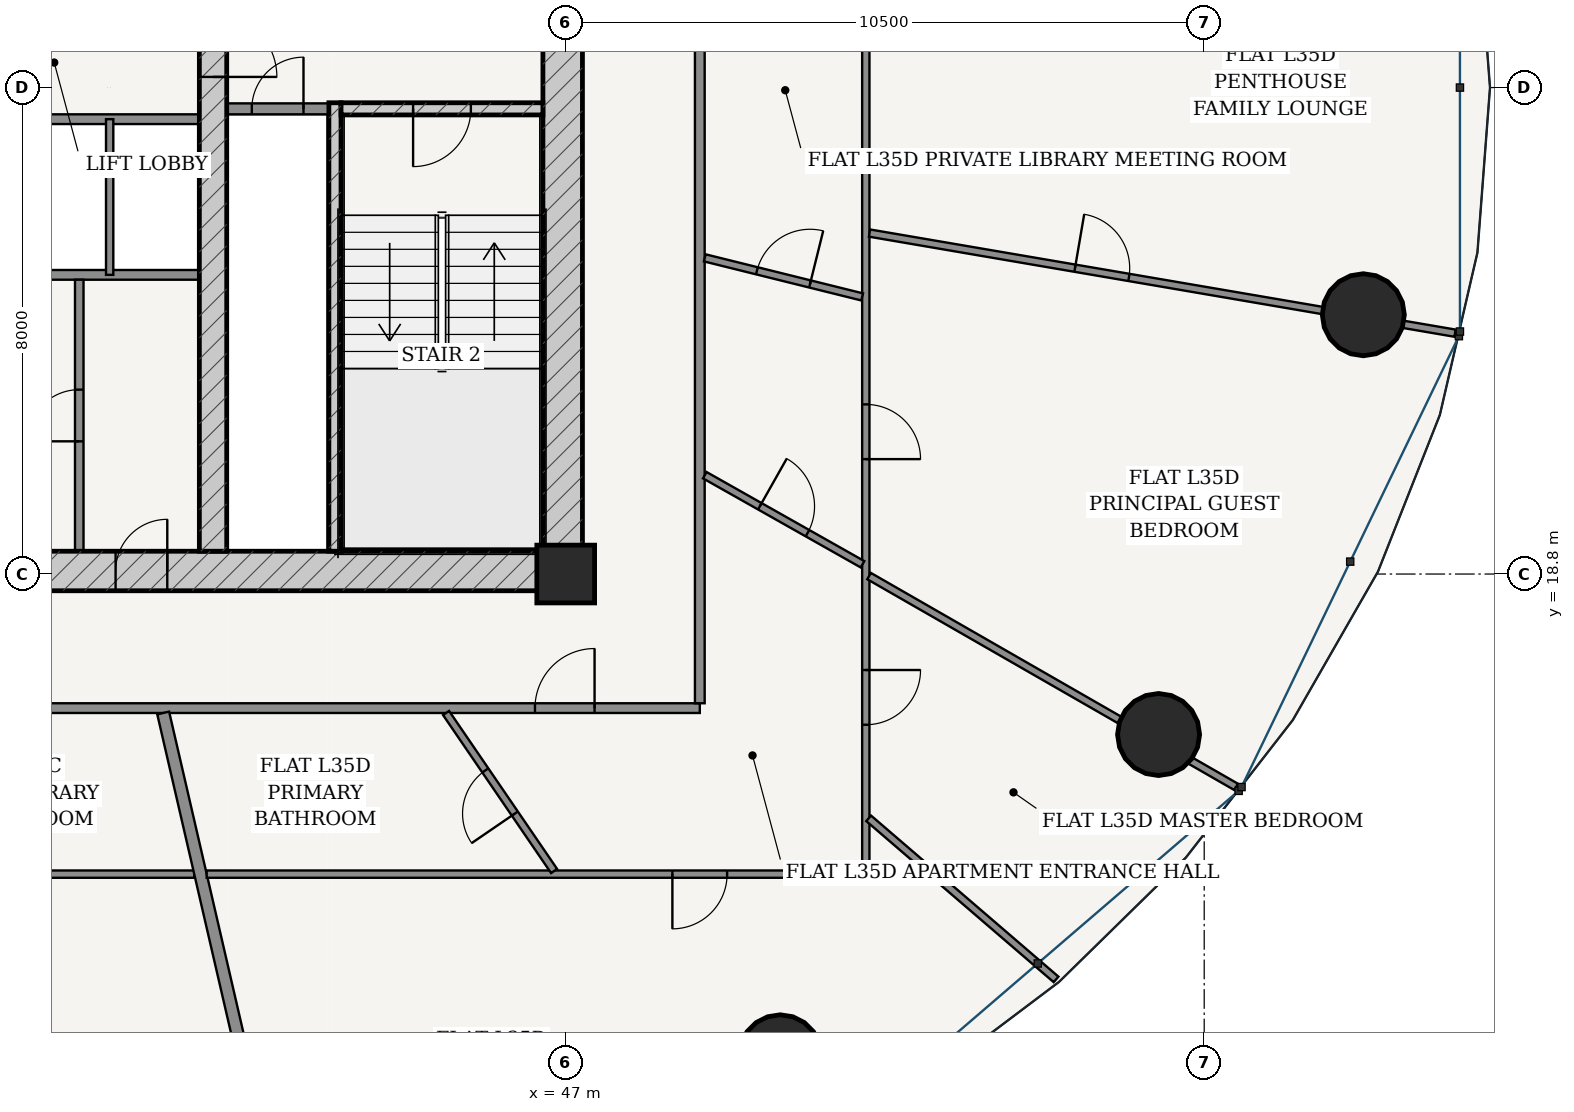
"""IFC4 building model, lengths in metres.
Left out: names, types, materials, properties, quantities, classifications, styles, units other than length and angle.
Written with IfcOpenShell. Run it as: python <this file> out.ifc"""

import sys

from ifc_helpers import new_model, si_unit, direction, frame, frame_2d, origin, origin_2d, place, context, subcontext, project, spatial, rectangle, hollow_circle, extrude, source, transform, mapped, element, fill, save


model = new_model("IFC4")
c1 = context("Model", 3, precision=1e-05, world=origin(), true_north=direction((-0.2419218956, 0.970295726276)))
c2 = subcontext(c1, "Body", "Model", "MODEL_VIEW")
j1 = project(units=[si_unit("LENGTHUNIT", "METRE"), si_unit("PLANEANGLEUNIT", "RADIAN")], contexts=[c1])
p1 = place(None, origin())
s1 = spatial("IfcSite", under=j1, at=p1, CompositionType="ELEMENT")
p2 = place(p1, origin())
s2 = spatial("IfcBuilding", under=s1, at=p2, CompositionType="ELEMENT")
p3 = place(p2, frame((0.0, 0.0, 135.4)))
s3 = spatial("IfcBuildingStorey", under=s2, at=p3, CompositionType="ELEMENT", Elevation=135.4)
p4 = place(p3, frame((47.0, 18.8, 0.0), z_axis=(0.0, 0.0, 1.0), x_axis=(1.0, 0.0, 0.0)))
e1 = element("IfcColumn", 1, at=p4, inside=s3, PredefinedType="COLUMN", context=c2, shape_type="SweptSolid", body=[
    extrude(rectangle(XDim=0.95, YDim=0.95, at=origin_2d()), origin(), (0.0, 0.0, 1.0), 3.6),
])
p5 = place(p3, frame((28.725, 18.85, 0.0), z_axis=(0.0, 0.0, 1.0), x_axis=(1.0, 0.0, 0.0)))
e2 = element("IfcWall", 2, at=p5, inside=s3, PredefinedType="SHEAR", context=c2, shape_type="SweptSolid", body=[
    extrude(rectangle(XDim=18.55, YDim=0.65, at=frame_2d((9.275, 0.0))), origin(), (0.0, 0.0, 1.0), 3.33),
])
p6 = place(p5, frame((6.827, 0.0, 0.0)))
e3 = element("IfcOpeningElement", 3, at=p6, cuts=e2, PredefinedType="OPENING", context=c2, shape_type="SweptSolid", body=[
    extrude(rectangle(XDim=0.85, YDim=2.1, at=frame_2d((0.425, 1.05))), frame((0.0, 0.335, 0.0), z_axis=(0.0, -1.0, 0.0), x_axis=(1.0, 0.0, 0.0)), (0.0, 0.0, 1.0), 0.67),
])
p7 = place(p5, frame((8.85, 0.0, 0.0)))
e4 = element("IfcOpeningElement", 4, at=p7, cuts=e2, PredefinedType="OPENING", context=c2, shape_type="SweptSolid", body=[
    extrude(rectangle(XDim=0.85, YDim=2.1, at=frame_2d((0.425, 1.05))), frame((0.0, 0.335, 0.0), z_axis=(0.0, -1.0, 0.0), x_axis=(1.0, 0.0, 0.0)), (0.0, 0.0, 1.0), 0.67),
])
p8 = place(p5, frame((10.873, 0.0, 0.0)))
e5 = element("IfcOpeningElement", 5, at=p8, cuts=e2, PredefinedType="OPENING", context=c2, shape_type="SweptSolid", body=[
    extrude(rectangle(XDim=0.85, YDim=2.1, at=frame_2d((0.425, 1.05))), frame((0.0, 0.335, 0.0), z_axis=(0.0, -1.0, 0.0), x_axis=(1.0, 0.0, 0.0)), (0.0, 0.0, 1.0), 0.67),
])
p9 = place(p3, frame((46.95, 19.175, 0.0), z_axis=(0.0, 0.0, 1.0), x_axis=(0.0, 1.0, 0.0)))
e6 = element("IfcWall", 6, at=p9, inside=s3, PredefinedType="SHEAR", context=c2, shape_type="SweptSolid", body=[
    extrude(rectangle(XDim=15.25, YDim=0.65, at=frame_2d((7.625, 0.0))), origin(), (0.0, 0.0, 1.0), 3.33),
])
p10 = place(p9, frame((9.875, 0.0, 0.0)))
e7 = element("IfcOpeningElement", 7, at=p10, cuts=e6, PredefinedType="OPENING", context=c2, shape_type="SweptSolid", body=[
    extrude(rectangle(XDim=1.5, YDim=2.2, at=frame_2d((0.75, 1.1))), frame((0.0, 0.335, 0.0), z_axis=(0.0, -1.0, 0.0), x_axis=(1.0, 0.0, 0.0)), (0.0, 0.0, 1.0), 0.67),
])
p11 = place(p3, frame((43.205, 19.175, 0.0), z_axis=(0.0, 0.0, 1.0), x_axis=(0.0, 1.0, 0.0)))
e8 = element("IfcWall", 8, at=p11, inside=s3, PredefinedType="SOLIDWALL", context=c2, shape_type="SweptSolid", body=[
    extrude(rectangle(XDim=7.375, YDim=0.2, at=frame_2d((3.688, 0.0))), origin(), (0.0, 0.0, 1.0), 3.33),
])
p12 = place(p3, frame((43.305, 26.45, 0.0), z_axis=(0.0, 0.0, 1.0), x_axis=(1.0, 0.0, 0.0)))
e9 = element("IfcWall", 9, at=p12, inside=s3, PredefinedType="SOLIDWALL", context=c2, shape_type="SweptSolid", body=[
    extrude(rectangle(XDim=3.32, YDim=0.2, at=frame_2d((1.66, 0.0))), origin(), (0.0, 0.0, 1.0), 3.33),
])
p13 = place(p12, frame((1.185, 0.0, 0.0)))
e10 = element("IfcOpeningElement", 10, at=p13, cuts=e9, PredefinedType="OPENING", context=c2, shape_type="SweptSolid", body=[
    extrude(rectangle(XDim=0.95, YDim=2.15, at=frame_2d((0.475, 1.075))), frame((0.0, 0.11, 0.0), z_axis=(0.0, -1.0, 0.0), x_axis=(1.0, 0.0, 0.0)), (0.0, 0.0, 1.0), 0.22),
])
p14 = place(p3, frame((41.2, 19.175, 0.0), z_axis=(0.0, 0.0, 1.0), x_axis=(0.0, 1.0, 0.0)))
e11 = element("IfcWall", 11, at=p14, inside=s3, PredefinedType="SHEAR", context=c2, shape_type="SweptSolid", body=[
    extrude(rectangle(XDim=15.25, YDim=0.45, at=frame_2d((7.625, 0.0))), origin(), (0.0, 0.0, 1.0), 3.33),
])
p15 = place(p14, frame((7.8, 0.0, 0.0)))
e12 = element("IfcOpeningElement", 12, at=p15, cuts=e11, PredefinedType="OPENING", context=c2, shape_type="SweptSolid", body=[
    extrude(rectangle(XDim=1.05, YDim=2.15, at=frame_2d((0.525, 1.075))), frame((0.0, 0.235, 0.0), z_axis=(0.0, -1.0, 0.0), x_axis=(1.0, 0.0, 0.0)), (0.0, 0.0, 1.0), 0.47),
])
for number, where, z_axis, x_axis in (
    (13, (50.528, 10.877, 0.0), (0.0, 0.0, 1.0), (1.0, 0.0, 0.0)),
    (14, (56.75, 16.161, 0.0), (0.0, 0.0, 1.0), (1.0, 0.0, 0.0)),
    (15, (60.117, 23.064, 0.0), (0.0, 0.0, 1.0), (1.0, 0.0, 0.0)),
):
    element("IfcColumn", number, at=place(p3, frame(where, z_axis=z_axis, x_axis=x_axis)), inside=s3, PredefinedType="COLUMN", context=c2, shape_type="SweptSolid", body=[
        extrude(hollow_circle(Radius=0.675, WallThickness=0.042, at=origin_2d()), origin(), (0.0, 0.0, 1.0), 3.6),
    ])
p16 = place(p3, frame((41.425, 26.45, 0.0), z_axis=(0.0, 0.0, 1.0), x_axis=(1.0, 0.0, 0.0)))
e16 = element("IfcWall", 16, at=p16, inside=s3, PredefinedType="PARTITIONING", context=c2, shape_type="SweptSolid", body=[
    extrude(rectangle(XDim=1.675, YDim=0.18, at=frame_2d((0.837, 0.0))), origin(), (0.0, 0.0, 1.0), 3.33),
])
p17 = place(p16, frame((0.413, 0.0, 0.0)))
e17 = element("IfcOpeningElement", 17, at=p17, cuts=e16, PredefinedType="OPENING", context=c2, shape_type="SweptSolid", body=[
    extrude(rectangle(XDim=0.85, YDim=2.1, at=frame_2d((0.425, 1.05))), frame((0.0, 0.1, 0.0), z_axis=(0.0, -1.0, 0.0), x_axis=(1.0, 0.0, 0.0)), (0.0, 0.0, 1.0), 0.2),
])
p18 = place(p3, frame((35.025, 26.28, 0.0), z_axis=(0.0, 0.0, 1.0), x_axis=(1.0, 0.0, 0.0)))
e18 = element("IfcWall", 18, at=p18, inside=s3, PredefinedType="PARTITIONING", context=c2, shape_type="SweptSolid", body=[
    extrude(rectangle(XDim=5.95, YDim=0.16, at=frame_2d((2.975, 0.0))), origin(), (0.0, 0.0, 1.0), 3.33),
])
p19 = place(p18, frame((0.19, 0.0, 0.0)))
e19 = element("IfcOpeningElement", 19, at=p19, cuts=e18, PredefinedType="OPENING", context=c2, shape_type="SweptSolid", body=[
    extrude(rectangle(XDim=1.1, YDim=2.2, at=frame_2d((0.55, 1.1))), frame((0.0, 0.09, 0.0), z_axis=(0.0, -1.0, 0.0), x_axis=(1.0, 0.0, 0.0)), (0.0, 0.0, 1.0), 0.18),
])
p20 = place(p18, frame((1.67, 0.0, 0.0)))
e20 = element("IfcOpeningElement", 20, at=p20, cuts=e18, PredefinedType="OPENING", context=c2, shape_type="SweptSolid", body=[
    extrude(rectangle(XDim=1.1, YDim=2.2, at=frame_2d((0.55, 1.1))), frame((0.0, 0.09, 0.0), z_axis=(0.0, -1.0, 0.0), x_axis=(1.0, 0.0, 0.0)), (0.0, 0.0, 1.0), 0.18),
])
p21 = place(p3, frame((35.025, 23.72, 0.0), z_axis=(0.0, 0.0, 1.0), x_axis=(1.0, 0.0, 0.0)))
e21 = element("IfcWall", 21, at=p21, inside=s3, PredefinedType="PARTITIONING", context=c2, shape_type="SweptSolid", body=[
    extrude(rectangle(XDim=5.95, YDim=0.16, at=frame_2d((2.975, 0.0))), origin(), (0.0, 0.0, 1.0), 3.33),
])
p22 = place(p3, frame((39.5, 23.72, 0.0), z_axis=(0.0, 0.0, 1.0), x_axis=(0.0, 1.0, 0.0)))
e22 = element("IfcWall", 22, at=p22, inside=s3, PredefinedType="PARTITIONING", context=c2, shape_type="SweptSolid", body=[
    extrude(rectangle(XDim=2.56, YDim=0.12, at=frame_2d((1.28, 0.0))), origin(), (0.0, 0.0, 1.0), 3.33),
])
p23 = place(p3, frame((39.0, 19.175, 0.0), z_axis=(0.0, 0.0, 1.0), x_axis=(0.0, 1.0, 0.0)))
e23 = element("IfcWall", 23, at=p23, inside=s3, PredefinedType="PARTITIONING", context=c2, shape_type="SweptSolid", body=[
    extrude(rectangle(XDim=4.465, YDim=0.14, at=frame_2d((2.232, 0.0))), origin(), (0.0, 0.0, 1.0), 3.33),
])
p24 = place(p23, frame((1.808, 0.0, 0.0)))
e24 = element("IfcOpeningElement", 24, at=p24, cuts=e23, PredefinedType="OPENING", context=c2, shape_type="SweptSolid", body=[
    extrude(rectangle(XDim=0.85, YDim=2.1, at=frame_2d((0.425, 1.05))), frame((0.0, 0.08, 0.0), z_axis=(0.0, -1.0, 0.0), x_axis=(1.0, 0.0, 0.0)), (0.0, 0.0, 1.0), 0.16),
])
p25 = place(p3, frame((34.32, 16.595, 0.0), z_axis=(0.0, 0.0, 1.0), x_axis=(1.0, 0.0, 0.0)))
e25 = element("IfcWall", 25, at=p25, inside=s3, PredefinedType="PARTITIONING", context=c2, shape_type="SweptSolid", body=[
    extrude(rectangle(XDim=14.885, YDim=0.16, at=frame_2d((7.442, 0.0))), origin(), (0.0, 0.0, 1.0), 2.776),
])
p26 = place(p25, frame((12.174, 0.0, 0.0)))
e26 = element("IfcOpeningElement", 26, at=p26, cuts=e25, PredefinedType="OPENING", context=c2, shape_type="SweptSolid", body=[
    extrude(rectangle(XDim=0.98, YDim=2.2, at=frame_2d((0.49, 1.1))), frame((0.0, 0.09, 0.0), z_axis=(0.0, -1.0, 0.0), x_axis=(1.0, 0.0, 0.0)), (0.0, 0.0, 1.0), 0.18),
])
p27 = place(p3, frame((49.205, 16.675, 0.0), z_axis=(0.0, 0.0, 1.0), x_axis=(0.0, 1.0, 0.0)))
e27 = element("IfcWall", 27, at=p27, inside=s3, PredefinedType="PARTITIONING", context=c2, shape_type="SweptSolid", body=[
    extrude(rectangle(XDim=18.4, YDim=0.16, at=frame_2d((9.2, 0.0))), origin(), (0.0, 0.0, 1.0), 2.776),
])
p28 = place(p3, frame((40.892, 13.865, 0.0), z_axis=(0.0, 0.0, 1.0), x_axis=(-1.0, 0.0, 0.0)))
e28 = element("IfcWall", 28, at=p28, inside=s3, PredefinedType="PARTITIONING", context=c2, shape_type="SweptSolid", body=[
    extrude(rectangle(XDim=9.302, YDim=0.12, at=frame_2d((4.651, 0.0))), origin(), (0.0, 0.0, 1.0), 2.776),
])
p29 = place(p28, frame((7.652, 0.0, 0.0)))
e29 = element("IfcOpeningElement", 29, at=p29, cuts=e28, PredefinedType="OPENING", context=c2, shape_type="SweptSolid", body=[
    extrude(rectangle(XDim=0.9, YDim=2.15, at=frame_2d((0.45, 1.075))), frame((0.0, 0.07, 0.0), z_axis=(0.0, -1.0, 0.0), x_axis=(1.0, 0.0, 0.0)), (0.0, 0.0, 1.0), 0.14),
])
p30 = place(p3, frame((40.38, 16.515, 0.0), z_axis=(0.0, 0.0, 1.0), x_axis=(0.225473598067, -0.974249278457, 0.0)))
e30 = element("IfcWall", 30, at=p30, inside=s3, PredefinedType="PARTITIONING", context=c2, shape_type="SweptSolid", body=[
    extrude(rectangle(XDim=10.278, YDim=0.2, at=frame_2d((5.139, 0.0))), origin(), (0.0, 0.0, 1.0), 2.776),
])
p31 = place(p3, frame((51.935, 29.08, 0.0), z_axis=(0.0, 0.0, 1.0), x_axis=(0.0, -1.0, 0.0)))
e31 = element("IfcWall", 31, at=p31, inside=s3, PredefinedType="PARTITIONING", context=c2, shape_type="SweptSolid", body=[
    extrude(rectangle(XDim=15.215, YDim=0.12, at=frame_2d((7.608, 0.0))), origin(), (0.0, 0.0, 1.0), 2.776),
])
p32 = place(p31, frame((11.859, 0.0, 0.0)))
e32 = element("IfcOpeningElement", 32, at=p32, cuts=e31, PredefinedType="OPENING", context=c2, shape_type="SweptSolid", body=[
    extrude(rectangle(XDim=0.9, YDim=2.15, at=frame_2d((0.45, 1.075))), frame((0.0, 0.07, 0.0), z_axis=(0.0, -1.0, 0.0), x_axis=(1.0, 0.0, 0.0)), (0.0, 0.0, 1.0), 0.14),
])
p33 = place(p31, frame((7.49, 0.0, 0.0)))
e33 = element("IfcOpeningElement", 33, at=p33, cuts=e31, PredefinedType="OPENING", context=c2, shape_type="SweptSolid", body=[
    extrude(rectangle(XDim=0.9, YDim=2.15, at=frame_2d((0.45, 1.075))), frame((0.0, 0.07, 0.0), z_axis=(0.0, -1.0, 0.0), x_axis=(1.0, 0.0, 0.0)), (0.0, 0.0, 1.0), 0.14),
])
p34 = place(p3, frame((51.935, 13.865, 0.0), z_axis=(0.0, 0.0, 1.0), x_axis=(-1.0, 0.0, 0.0)))
e34 = element("IfcWall", 34, at=p34, inside=s3, PredefinedType="PARTITIONING", context=c2, shape_type="SweptSolid", body=[
    extrude(rectangle(XDim=10.84, YDim=0.12, at=frame_2d((5.42, 0.0))), origin(), (0.0, 0.0, 1.0), 2.776),
])
p35 = place(p34, frame((2.281, 0.0, 0.0)))
e35 = element("IfcOpeningElement", 35, at=p35, cuts=e34, PredefinedType="OPENING", context=c2, shape_type="SweptSolid", body=[
    extrude(rectangle(XDim=0.9, YDim=2.15, at=frame_2d((0.45, 1.075))), frame((0.0, 0.07, 0.0), z_axis=(0.0, -1.0, 0.0), x_axis=(1.0, 0.0, 0.0)), (0.0, 0.0, 1.0), 0.14),
])
p36 = place(p3, frame((51.982, 14.782, 0.0), z_axis=(0.0, 0.0, 1.0), x_axis=(0.758356837469, -0.651839632935, 0.0)))
e36 = element("IfcWall", 36, at=p36, inside=s3, PredefinedType="PARTITIONING", context=c2, shape_type="SweptSolid", body=[
    extrude(rectangle(XDim=4.064, YDim=0.12, at=frame_2d((2.032, 0.0))), origin(), (0.0, 0.0, 1.0), 2.846),
])
p37 = place(p3, frame((51.989, 18.766, 0.0), z_axis=(0.0, 0.0, 1.0), x_axis=(0.86717064002, -0.498011125466, 0.0)))
e37 = element("IfcWall", 37, at=p37, inside=s3, PredefinedType="PARTITIONING", context=c2, shape_type="SweptSolid", body=[
    extrude(rectangle(XDim=6.961, YDim=0.12, at=frame_2d((3.48, 0.0))), origin(), (0.0, 0.0, 1.0), 2.776),
])
p38 = place(p3, frame((51.996, 24.407, 0.0), z_axis=(0.0, 0.0, 1.0), x_axis=(0.985698378271, -0.168519159369, 0.0)))
e38 = element("IfcWall", 38, at=p38, inside=s3, PredefinedType="PARTITIONING", context=c2, shape_type="SweptSolid", body=[
    extrude(rectangle(XDim=9.769, YDim=0.12, at=frame_2d((4.884, 0.0))), origin(), (0.0, 0.0, 1.0), 2.776),
])
p39 = place(p38, frame((3.428, 0.0, 0.0)))
e39 = element("IfcOpeningElement", 39, at=p39, cuts=e38, PredefinedType="OPENING", context=c2, shape_type="SweptSolid", body=[
    extrude(rectangle(XDim=0.9, YDim=2.15, at=frame_2d((0.45, 1.075))), frame((0.0, 0.07, 0.0), z_axis=(0.0, -1.0, 0.0), x_axis=(1.0, 0.0, 0.0)), (0.0, 0.0, 1.0), 0.14),
])
p40 = place(p3, frame((45.032, 16.515, 0.0), z_axis=(0.0, 0.0, 1.0), x_axis=(0.564486512722, -0.825442291717, 0.0)))
e40 = element("IfcWall", 40, at=p40, inside=s3, PredefinedType="PARTITIONING", context=c2, shape_type="SweptSolid", body=[
    extrude(rectangle(XDim=3.148, YDim=0.12, at=frame_2d((1.574, 0.0))), origin(), (0.0, 0.0, 1.0), 3.005),
])
p41 = place(p40, frame((1.144, 0.0, 0.0)))
e41 = element("IfcOpeningElement", 41, at=p41, cuts=e40, PredefinedType="OPENING", context=c2, shape_type="SweptSolid", body=[
    extrude(rectangle(XDim=0.86, YDim=2.15, at=frame_2d((0.43, 1.075))), frame((0.0, 0.07, 0.0), z_axis=(0.0, -1.0, 0.0), x_axis=(1.0, 0.0, 0.0)), (0.0, 0.0, 1.0), 0.14),
])
p42 = place(p3, frame((49.287, 20.426, 0.0), z_axis=(0.0, 0.0, 1.0), x_axis=(0.870723023576, -0.491773744942, 0.0)))
e42 = element("IfcWall", 42, at=p42, inside=s3, PredefinedType="PARTITIONING", context=c2, shape_type="SweptSolid", body=[
    extrude(rectangle(XDim=2.98, YDim=0.12, at=frame_2d((1.49, 0.0))), origin(), (0.0, 0.0, 1.0), 2.776),
])
p43 = place(p42, frame((1.04, 0.0, 0.0)))
e43 = element("IfcOpeningElement", 43, at=p43, cuts=e42, PredefinedType="OPENING", context=c2, shape_type="SweptSolid", body=[
    extrude(rectangle(XDim=0.9, YDim=2.15, at=frame_2d((0.45, 1.075))), frame((0.0, 0.07, 0.0), z_axis=(0.0, -1.0, 0.0), x_axis=(1.0, 0.0, 0.0)), (0.0, 0.0, 1.0), 0.14),
])
p44 = place(p3, frame((49.287, 23.999, 0.0), z_axis=(0.0, 0.0, 1.0), x_axis=(0.970571855633, -0.240811696256, 0.0)))
e44 = element("IfcWall", 44, at=p44, inside=s3, PredefinedType="PARTITIONING", context=c2, shape_type="SweptSolid", body=[
    extrude(rectangle(XDim=2.666, YDim=0.12, at=frame_2d((1.333, 0.0))), origin(), (0.0, 0.0, 1.0), 3.33),
])
p45 = place(p44, frame((0.883, 0.0, 0.0)))
e45 = element("IfcOpeningElement", 45, at=p45, cuts=e44, PredefinedType="OPENING", context=c2, shape_type="SweptSolid", body=[
    extrude(rectangle(XDim=0.9, YDim=2.15, at=frame_2d((0.45, 1.075))), frame((0.0, 0.07, 0.0), z_axis=(0.0, -1.0, 0.0), x_axis=(1.0, 0.0, 0.0)), (0.0, 0.0, 1.0), 0.14),
])
m1 = source(origin(), c2, "Body", "SweptSolid", [
    extrude(rectangle(XDim=1.05, YDim=2.15, at=frame_2d((0.525, 1.075))), frame((0.0, 0.025, 0.0), z_axis=(0.0, -1.0, 0.0), x_axis=(1.0, 0.0, 0.0)), (0.0, 0.0, 1.0), 0.05),
])
p46 = place(p15, frame((1.05, 0.0, 0.0), z_axis=(0.0, 0.0, 1.0), x_axis=(-1.0, 0.0, 0.0)))
e46 = element("IfcDoor", 46, at=p46, inside=s3, OperationType="SINGLE_SWING_RIGHT", PredefinedType="DOOR", context=c2, shape_type="MappedRepresentation", body=[
    mapped(m1, transform((0.0, 0.0, 0.0), scale=1.0)),
])
fill(e12, e46)
m2 = source(origin(), c2, "Body", "SweptSolid", [
    extrude(rectangle(XDim=0.95, YDim=2.15, at=frame_2d((0.475, 1.075))), frame((0.0, 0.025, 0.0), z_axis=(0.0, -1.0, 0.0), x_axis=(1.0, 0.0, 0.0)), (0.0, 0.0, 1.0), 0.05),
])
p47 = place(p13, frame((0.95, 0.0, 0.0), z_axis=(0.0, 0.0, 1.0), x_axis=(-1.0, 0.0, 0.0)))
e47 = element("IfcDoor", 47, at=p47, inside=s3, OperationType="SINGLE_SWING_RIGHT", PredefinedType="DOOR", context=c2, shape_type="MappedRepresentation", body=[
    mapped(m2, transform((0.0, 0.0, 0.0), scale=1.0)),
])
fill(e10, e47)
m3 = source(origin(), c2, "Body", "SweptSolid", [
    extrude(rectangle(XDim=0.85, YDim=2.1, at=frame_2d((0.425, 1.05))), frame((0.0, 0.025, 0.0), z_axis=(0.0, -1.0, 0.0), x_axis=(1.0, 0.0, 0.0)), (0.0, 0.0, 1.0), 0.05),
])
p48 = place(p17, origin())
e48 = element("IfcDoor", 48, at=p48, inside=s3, OperationType="SINGLE_SWING_RIGHT", PredefinedType="DOOR", context=c2, shape_type="MappedRepresentation", body=[
    mapped(m3, transform((0.0, 0.0, 0.0), scale=1.0)),
])
fill(e17, e48)
p49 = place(p8, origin())
e49 = element("IfcDoor", 49, at=p49, inside=s3, OperationType="SINGLE_SWING_RIGHT", PredefinedType="DOOR", context=c2, shape_type="MappedRepresentation", body=[
    mapped(m3, transform((0.0, 0.0, 0.0), scale=1.0)),
])
fill(e5, e49)
p50 = place(p24, origin())
e50 = element("IfcDoor", 50, at=p50, inside=s3, OperationType="SINGLE_SWING_LEFT", PredefinedType="DOOR", context=c2, shape_type="MappedRepresentation", body=[
    mapped(m3, transform((0.0, 0.0, 0.0), scale=1.0)),
])
fill(e24, e50)
m4 = source(origin(), c2, "Body", "SweptSolid", [
    extrude(rectangle(XDim=0.98, YDim=2.2, at=frame_2d((0.49, 1.1))), frame((0.0, 0.025, 0.0), z_axis=(0.0, -1.0, 0.0), x_axis=(1.0, 0.0, 0.0)), (0.0, 0.0, 1.0), 0.05),
])
p51 = place(p26, origin())
e51 = element("IfcDoor", 51, at=p51, inside=s3, OperationType="SINGLE_SWING_RIGHT", PredefinedType="DOOR", context=c2, shape_type="MappedRepresentation", body=[
    mapped(m4, transform((0.0, 0.0, 0.0), scale=1.0)),
])
fill(e26, e51)
m5 = source(origin(), c2, "Body", "SweptSolid", [
    extrude(rectangle(XDim=0.86, YDim=2.15, at=frame_2d((0.43, 1.075))), frame((0.0, 0.025, 0.0), z_axis=(0.0, -1.0, 0.0), x_axis=(1.0, 0.0, 0.0)), (0.0, 0.0, 1.0), 0.05),
])
p52 = place(p41, frame((0.86, 0.0, 0.0), z_axis=(0.0, 0.0, 1.0), x_axis=(-1.0, 0.0, 0.0)))
e52 = element("IfcDoor", 52, at=p52, inside=s3, OperationType="SINGLE_SWING_LEFT", PredefinedType="DOOR", context=c2, shape_type="MappedRepresentation", body=[
    mapped(m5, transform((0.0, 0.0, 0.0), scale=1.0)),
])
fill(e41, e52)
m6 = source(origin(), c2, "Body", "SweptSolid", [
    extrude(rectangle(XDim=0.9, YDim=2.15, at=frame_2d((0.45, 1.075))), frame((0.0, 0.025, 0.0), z_axis=(0.0, -1.0, 0.0), x_axis=(1.0, 0.0, 0.0)), (0.0, 0.0, 1.0), 0.05),
])
p53 = place(p35, origin())
e53 = element("IfcDoor", 53, at=p53, inside=s3, OperationType="SINGLE_SWING_RIGHT", PredefinedType="DOOR", context=c2, shape_type="MappedRepresentation", body=[
    mapped(m6, transform((0.0, 0.0, 0.0), scale=1.0)),
])
fill(e35, e53)
p54 = place(p43, origin())
e54 = element("IfcDoor", 54, at=p54, inside=s3, OperationType="SINGLE_SWING_LEFT", PredefinedType="DOOR", context=c2, shape_type="MappedRepresentation", body=[
    mapped(m6, transform((0.0, 0.0, 0.0), scale=1.0)),
])
fill(e43, e54)
p55 = place(p45, origin())
e55 = element("IfcDoor", 55, at=p55, inside=s3, OperationType="SINGLE_SWING_RIGHT", PredefinedType="DOOR", context=c2, shape_type="MappedRepresentation", body=[
    mapped(m6, transform((0.0, 0.0, 0.0), scale=1.0)),
])
fill(e45, e55)
p56 = place(p32, origin())
e56 = element("IfcDoor", 56, at=p56, inside=s3, OperationType="SINGLE_SWING_LEFT", PredefinedType="DOOR", context=c2, shape_type="MappedRepresentation", body=[
    mapped(m6, transform((0.0, 0.0, 0.0), scale=1.0)),
])
fill(e32, e56)
p57 = place(p33, origin())
e57 = element("IfcDoor", 57, at=p57, inside=s3, OperationType="SINGLE_SWING_RIGHT", PredefinedType="DOOR", context=c2, shape_type="MappedRepresentation", body=[
    mapped(m6, transform((0.0, 0.0, 0.0), scale=1.0)),
])
fill(e33, e57)
p58 = place(p39, origin())
e58 = element("IfcDoor", 58, at=p58, inside=s3, OperationType="SINGLE_SWING_LEFT", PredefinedType="DOOR", context=c2, shape_type="MappedRepresentation", body=[
    mapped(m6, transform((0.0, 0.0, 0.0), scale=1.0)),
])
fill(e39, e58)
save(model, sys.argv[1])
